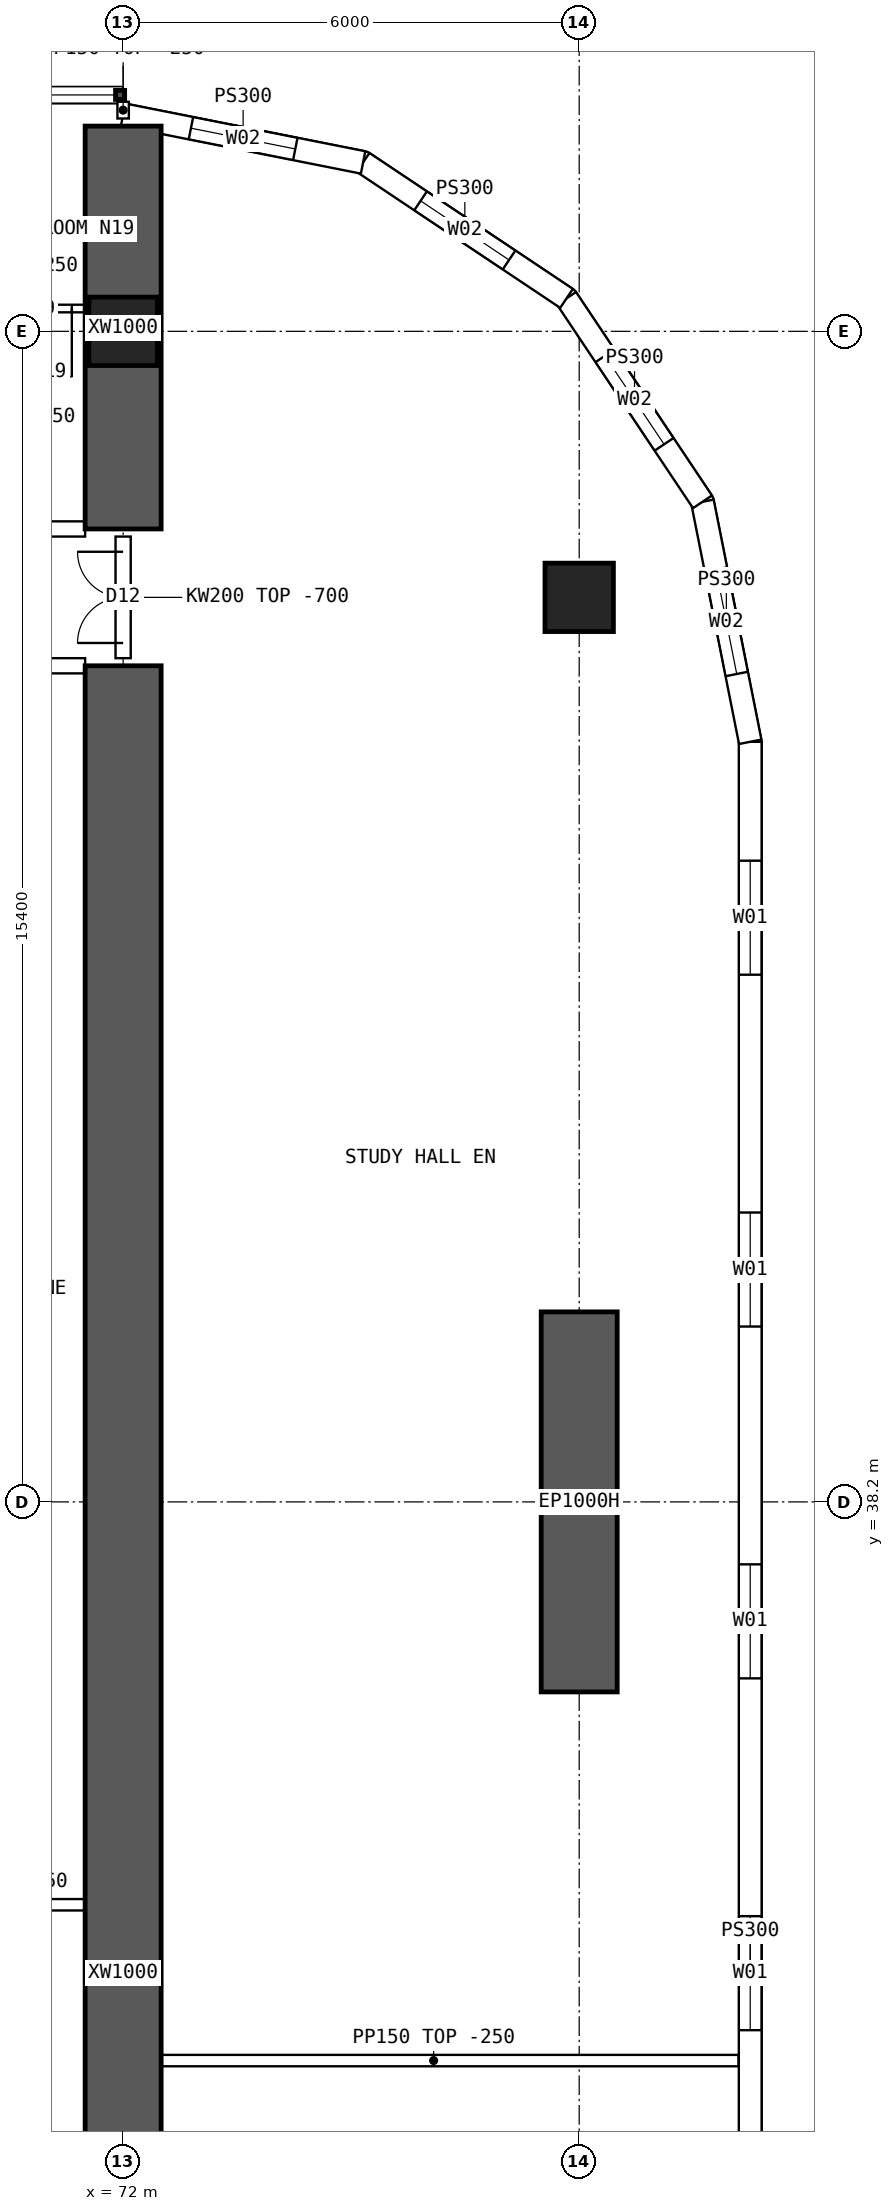
"""IFC4 building model, lengths in metres.
Left out: names, types, materials, properties, quantities, classifications, styles, units other than length and angle.
Written with IfcOpenShell. Run it as: python <this file> out.ifc"""

import sys

from ifc_helpers import new_model, si_unit, direction, frame, frame_2d, origin, origin_2d, place, context, subcontext, project, spatial, polyline, rectangle, hollow_rectangle, outline, extrude, element, fill, save


model = new_model("IFC4")
c1 = context("Model", 3, precision=1e-05, world=origin(), true_north=direction((0.0, 1.0)))
c2 = subcontext(c1, "Body", "Model", "MODEL_VIEW")
j1 = project(units=[si_unit("LENGTHUNIT", "METRE"), si_unit("PLANEANGLEUNIT", "RADIAN")], contexts=[c1])
p1 = place(None, origin())
s1 = spatial("IfcSite", under=j1, at=p1, CompositionType="ELEMENT")
p2 = place(p1, origin())
s2 = spatial("IfcBuilding", under=s1, at=p2, CompositionType="ELEMENT")
p3 = place(p2, frame((0.0, 0.0, 42.7)))
s3 = spatial("IfcBuildingStorey", under=s2, at=p3, CompositionType="ELEMENT", Elevation=42.7)
for number, where, z_axis, x_axis in (
    (1, (72.0, 53.6, 0.0), (0.0, 0.0, 1.0), (1.0, 0.0, 0.0)),
    (2, (78.0, 50.1, 0.0), (0.0, 0.0, 1.0), (1.0, 0.0, 0.0)),
):
    element("IfcColumn", number, at=place(p3, frame(where, z_axis=z_axis, x_axis=x_axis)), inside=s3, PredefinedType="COLUMN", context=c2, shape_type="SweptSolid", body=[
        extrude(hollow_rectangle(XDim=0.9, YDim=0.9, WallThickness=0.09, at=origin_2d()), origin(), (0.0, 0.0, 1.0), 3.75),
    ])
p4 = place(p3, frame((78.0, 35.7, 0.0), z_axis=(0.0, 0.0, 1.0), x_axis=(0.0, 1.0, 0.0)))
e3 = element("IfcWall", 3, at=p4, inside=s3, PredefinedType="SHEAR", context=c2, shape_type="SweptSolid", body=[
    extrude(rectangle(XDim=5.0, YDim=1.0, at=frame_2d((2.5, 0.0))), origin(), (0.0, 0.0, 1.0), 3.75),
])
p5 = place(p3, frame((72.0, 51.0, 0.0), z_axis=(0.0, 0.0, 1.0), x_axis=(0.0, 1.0, 0.0)))
e4 = element("IfcWall", 4, at=p5, inside=s3, PredefinedType="SHEAR", context=c2, shape_type="SweptSolid", body=[
    extrude(rectangle(XDim=5.3, YDim=1.0, at=frame_2d((2.65, 0.0))), origin(), (0.0, 0.0, 1.0), 3.75),
])
p6 = place(p3, frame((72.0, 14.8, 0.0), z_axis=(0.0, 0.0, 1.0), x_axis=(0.0, 1.0, 0.0)))
e5 = element("IfcWall", 5, at=p6, inside=s3, PredefinedType="SHEAR", context=c2, shape_type="SweptSolid", body=[
    extrude(rectangle(XDim=34.4, YDim=1.0, at=frame_2d((17.2, 0.0))), origin(), (0.0, 0.0, 1.0), 3.75),
])
p7 = place(p3, frame((80.25, 15.8, 0.0), z_axis=(0.0, 0.0, 1.0), x_axis=(0.0, 1.0, 0.0)))
e6 = element("IfcWall", 6, at=p7, inside=s3, PredefinedType="SOLIDWALL", context=c2, shape_type="SweptSolid", body=[
    extrude(outline(polyline([(-0.015, -0.15), (32.415, -0.15), (32.385, 0.15), (0.015, 0.15), (-0.015, -0.15)])), origin(), (0.0, 0.0, 1.0), 3.5),
])
p8 = place(p7, frame((1.564, 0.0, 0.9)))
e7 = element("IfcOpeningElement", 7, at=p8, cuts=e6, PredefinedType="OPENING", context=c2, shape_type="SweptSolid", body=[
    extrude(rectangle(XDim=1.5, YDim=2.0, at=frame_2d((0.75, 1.0))), frame((0.0, 0.16, 0.0), z_axis=(0.0, -1.0, 0.0), x_axis=(1.0, 0.0, 0.0)), (0.0, 0.0, 1.0), 0.32),
])
p9 = place(p7, frame((6.193, 0.0, 0.9)))
e8 = element("IfcOpeningElement", 8, at=p9, cuts=e6, PredefinedType="OPENING", context=c2, shape_type="SweptSolid", body=[
    extrude(rectangle(XDim=1.5, YDim=2.0, at=frame_2d((0.75, 1.0))), frame((0.0, 0.16, 0.0), z_axis=(0.0, -1.0, 0.0), x_axis=(1.0, 0.0, 0.0)), (0.0, 0.0, 1.0), 0.32),
])
p10 = place(p7, frame((10.822, 0.0, 0.9)))
e9 = element("IfcOpeningElement", 9, at=p10, cuts=e6, PredefinedType="OPENING", context=c2, shape_type="SweptSolid", body=[
    extrude(rectangle(XDim=1.5, YDim=2.0, at=frame_2d((0.75, 1.0))), frame((0.0, 0.16, 0.0), z_axis=(0.0, -1.0, 0.0), x_axis=(1.0, 0.0, 0.0)), (0.0, 0.0, 1.0), 0.32),
])
p11 = place(p7, frame((15.45, 0.0, 0.9)))
e10 = element("IfcOpeningElement", 10, at=p11, cuts=e6, PredefinedType="OPENING", context=c2, shape_type="SweptSolid", body=[
    extrude(rectangle(XDim=1.5, YDim=2.0, at=frame_2d((0.75, 1.0))), frame((0.0, 0.16, 0.0), z_axis=(0.0, -1.0, 0.0), x_axis=(1.0, 0.0, 0.0)), (0.0, 0.0, 1.0), 0.32),
])
p12 = place(p7, frame((20.079, 0.0, 0.9)))
e11 = element("IfcOpeningElement", 11, at=p12, cuts=e6, PredefinedType="OPENING", context=c2, shape_type="SweptSolid", body=[
    extrude(rectangle(XDim=1.5, YDim=2.0, at=frame_2d((0.75, 1.0))), frame((0.0, 0.16, 0.0), z_axis=(0.0, -1.0, 0.0), x_axis=(1.0, 0.0, 0.0)), (0.0, 0.0, 1.0), 0.32),
])
p13 = place(p7, frame((24.707, 0.0, 0.9)))
e12 = element("IfcOpeningElement", 12, at=p13, cuts=e6, PredefinedType="OPENING", context=c2, shape_type="SweptSolid", body=[
    extrude(rectangle(XDim=1.5, YDim=2.0, at=frame_2d((0.75, 1.0))), frame((0.0, 0.16, 0.0), z_axis=(0.0, -1.0, 0.0), x_axis=(1.0, 0.0, 0.0)), (0.0, 0.0, 1.0), 0.32),
])
p14 = place(p7, frame((29.336, 0.0, 0.9)))
e13 = element("IfcOpeningElement", 13, at=p14, cuts=e6, PredefinedType="OPENING", context=c2, shape_type="SweptSolid", body=[
    extrude(rectangle(XDim=1.5, YDim=2.0, at=frame_2d((0.75, 1.0))), frame((0.0, 0.16, 0.0), z_axis=(0.0, -1.0, 0.0), x_axis=(1.0, 0.0, 0.0)), (0.0, 0.0, 1.0), 0.32),
])
p15 = place(p3, frame((80.25, 48.2, 0.0), z_axis=(0.0, 0.0, 1.0), x_axis=(-0.195065901187, 0.980790137692, 0.0)))
e14 = element("IfcWall", 14, at=p15, inside=s3, PredefinedType="SOLIDWALL", context=c2, shape_type="SweptSolid", body=[
    extrude(outline(polyline([(-0.015, -0.15), (3.249, -0.15), (3.189, 0.15), (0.015, 0.15), (-0.015, -0.15)])), origin(), (0.0, 0.0, 1.0), 3.5),
])
p16 = place(p15, frame((0.909, 0.0, 0.9)))
e15 = element("IfcOpeningElement", 15, at=p16, cuts=e14, PredefinedType="OPENING", context=c2, shape_type="SweptSolid", body=[
    extrude(rectangle(XDim=1.4, YDim=1.8, at=frame_2d((0.7, 0.9))), frame((0.0, 0.16, 0.0), z_axis=(0.0, -1.0, 0.0), x_axis=(1.0, 0.0, 0.0)), (0.0, 0.0, 1.0), 0.32),
])
p17 = place(p3, frame((79.622, 51.357, 0.0), z_axis=(0.0, 0.0, 1.0), x_axis=(-0.555609954424, 0.831443069936, 0.0)))
e16 = element("IfcWall", 16, at=p17, inside=s3, PredefinedType="SOLIDWALL", context=c2, shape_type="SweptSolid", body=[
    extrude(outline(polyline([(-0.03, -0.15), (3.249, -0.15), (3.189, 0.15), (0.03, 0.15), (-0.03, -0.15)])), origin(), (0.0, 0.0, 1.0), 3.5),
])
p18 = place(p17, frame((0.909, 0.0, 0.9)))
e17 = element("IfcOpeningElement", 17, at=p18, cuts=e16, PredefinedType="OPENING", context=c2, shape_type="SweptSolid", body=[
    extrude(rectangle(XDim=1.4, YDim=1.8, at=frame_2d((0.7, 0.9))), frame((0.0, 0.16, 0.0), z_axis=(0.0, -1.0, 0.0), x_axis=(1.0, 0.0, 0.0)), (0.0, 0.0, 1.0), 0.32),
])
p19 = place(p3, frame((77.833, 54.034, 0.0), z_axis=(0.0, 0.0, 1.0), x_axis=(-0.831478105043, 0.555557522525, 0.0)))
e18 = element("IfcWall", 18, at=p19, inside=s3, PredefinedType="SOLIDWALL", context=c2, shape_type="SweptSolid", body=[
    extrude(outline(polyline([(-0.03, -0.15), (3.249, -0.15), (3.189, 0.15), (0.03, 0.15), (-0.03, -0.15)])), origin(), (0.0, 0.0, 1.0), 3.5),
])
p20 = place(p19, frame((0.909, 0.0, 0.9)))
e19 = element("IfcOpeningElement", 19, at=p20, cuts=e18, PredefinedType="OPENING", context=c2, shape_type="SweptSolid", body=[
    extrude(rectangle(XDim=1.4, YDim=1.8, at=frame_2d((0.7, 0.9))), frame((0.0, 0.16, 0.0), z_axis=(0.0, -1.0, 0.0), x_axis=(1.0, 0.0, 0.0)), (0.0, 0.0, 1.0), 0.32),
])
p21 = place(p3, frame((75.157, 55.822, 0.0), z_axis=(0.0, 0.0, 1.0), x_axis=(-0.980787251524, 0.195080412259, 0.0)))
e20 = element("IfcWall", 20, at=p21, inside=s3, PredefinedType="SOLIDWALL", context=c2, shape_type="SweptSolid", body=[
    extrude(outline(polyline([(-0.03, -0.15), (3.249, -0.15), (3.189, 0.15), (0.03, 0.15), (-0.03, -0.15)])), origin(), (0.0, 0.0, 1.0), 3.5),
])
p22 = place(p21, frame((0.909, 0.0, 0.9)))
e21 = element("IfcOpeningElement", 21, at=p22, cuts=e20, PredefinedType="OPENING", context=c2, shape_type="SweptSolid", body=[
    extrude(rectangle(XDim=1.4, YDim=1.8, at=frame_2d((0.7, 0.9))), frame((0.0, 0.16, 0.0), z_axis=(0.0, -1.0, 0.0), x_axis=(1.0, 0.0, 0.0)), (0.0, 0.0, 1.0), 0.32),
])
p23 = place(p3, frame((66.5, 51.0, 0.0), z_axis=(0.0, 0.0, 1.0), x_axis=(1.0, 0.0, 0.0)))
e22 = element("IfcWall", 22, at=p23, inside=s3, PredefinedType="SOLIDWALL", context=c2, shape_type="SweptSolid", body=[
    extrude(outline(polyline([(0.0, 0.0), (5.0, 0.0), (5.0, 3.1), (0.0, 3.1), (0.0, 0.0)])), frame((0.0, 0.1, 0.0), z_axis=(0.0, -1.0, 0.0), x_axis=(1.0, 0.0, 0.0)), (0.0, 0.0, 1.0), 0.2),
])
p24 = place(p23, frame((1.3, 0.0, 0.0)))
e23 = element("IfcOpeningElement", 23, at=p24, cuts=e22, PredefinedType="OPENING", context=c2, shape_type="SweptSolid", body=[
    extrude(rectangle(XDim=0.9, YDim=2.1, at=frame_2d((0.45, 1.05))), frame((0.0, 0.11, 0.0), z_axis=(0.0, -1.0, 0.0), x_axis=(1.0, 0.0, 0.0)), (0.0, 0.0, 1.0), 0.22),
])
p25 = place(p23, frame((2.675, 0.0, 0.0)))
e24 = element("IfcOpeningElement", 24, at=p25, cuts=e22, PredefinedType="OPENING", context=c2, shape_type="SweptSolid", body=[
    extrude(rectangle(XDim=0.9, YDim=2.1, at=frame_2d((0.45, 1.05))), frame((0.0, 0.11, 0.0), z_axis=(0.0, -1.0, 0.0), x_axis=(1.0, 0.0, 0.0)), (0.0, 0.0, 1.0), 0.22),
])
p26 = place(p3, frame((66.5, 49.2, 0.0), z_axis=(0.0, 0.0, 1.0), x_axis=(1.0, 0.0, 0.0)))
e25 = element("IfcWall", 25, at=p26, inside=s3, PredefinedType="SOLIDWALL", context=c2, shape_type="SweptSolid", body=[
    extrude(rectangle(XDim=5.0, YDim=0.2, at=frame_2d((2.5, 0.0))), origin(), (0.0, 0.0, 1.0), 3.5),
])
p27 = place(p26, frame((0.2, 0.0, 0.0)))
e26 = element("IfcOpeningElement", 26, at=p27, cuts=e25, PredefinedType="OPENING", context=c2, shape_type="SweptSolid", body=[
    extrude(rectangle(XDim=1.6, YDim=2.1, at=frame_2d((0.8, 1.05))), frame((0.0, 0.11, 0.0), z_axis=(0.0, -1.0, 0.0), x_axis=(1.0, 0.0, 0.0)), (0.0, 0.0, 1.0), 0.22),
])
p28 = place(p3, frame((70.25, 53.9, 0.0), z_axis=(0.0, 0.0, 1.0), x_axis=(1.0, 0.0, 0.0)))
e27 = element("IfcWall", 27, at=p28, inside=s3, PredefinedType="PARTITIONING", context=c2, shape_type="SweptSolid", body=[
    extrude(rectangle(XDim=1.3, YDim=0.1, at=frame_2d((0.65, 0.0))), origin(), (0.0, 0.0, 1.0), 3.5),
])
p29 = place(p28, frame((0.175, 0.0, 0.0)))
e28 = element("IfcOpeningElement", 28, at=p29, cuts=e27, PredefinedType="OPENING", context=c2, shape_type="SweptSolid", body=[
    extrude(rectangle(XDim=0.9, YDim=2.1, at=frame_2d((0.45, 1.05))), frame((0.0, 0.06, 0.0), z_axis=(0.0, -1.0, 0.0), x_axis=(1.0, 0.0, 0.0)), (0.0, 0.0, 1.0), 0.12),
])
p30 = place(p3, frame((68.4, 32.9, 0.0), z_axis=(0.0, 0.0, 1.0), x_axis=(1.0, 0.0, 0.0)))
e29 = element("IfcWall", 29, at=p30, inside=s3, PredefinedType="PARTITIONING", context=c2, shape_type="SweptSolid", body=[
    extrude(rectangle(XDim=3.6, YDim=0.15, at=frame_2d((1.8, 0.0))), origin(), (0.0, 0.0, 1.0), 3.5),
])
p31 = place(p3, frame((72.075, 30.85, 0.0), z_axis=(0.0, 0.0, 1.0), x_axis=(1.0, 0.0, 0.0)))
e30 = element("IfcWall", 30, at=p31, inside=s3, PredefinedType="PARTITIONING", context=c2, shape_type="SweptSolid", body=[
    extrude(outline(polyline([(0.0, 0.0), (8.02, 0.0), (8.02, 3.5), (6.227, 3.5), (6.225, 3.05), (5.627, 3.05), (5.625, 3.5), (0.0, 3.5), (0.0, 0.0)])), frame((0.0, 0.075, 0.0), z_axis=(0.0, -1.0, 0.0), x_axis=(1.0, 0.0, 0.0)), (0.0, 0.0, 1.0), 0.15),
])
p32 = place(p3, frame((72.0, 49.3, 0.0), z_axis=(0.0, 0.0, 1.0), x_axis=(0.0, 1.0, 0.0)))
e31 = element("IfcWall", 31, at=p32, inside=s3, PredefinedType="SOLIDWALL", context=c2, shape_type="SweptSolid", body=[
    extrude(outline(polyline([(0.0, 0.0), (1.6, 0.0), (1.6, 3.05), (0.0, 3.05), (0.0, 0.0)])), frame((0.0, 0.1, 0.0), z_axis=(0.0, -1.0, 0.0), x_axis=(1.0, 0.0, 0.0)), (0.0, 0.0, 1.0), 0.2),
])
p33 = place(p32, frame((0.2, 0.0, 0.0)))
e32 = element("IfcOpeningElement", 32, at=p33, cuts=e31, PredefinedType="OPENING", context=c2, shape_type="SweptSolid", body=[
    extrude(rectangle(XDim=1.2, YDim=2.1, at=frame_2d((0.6, 1.05))), frame((0.0, 0.11, 0.0), z_axis=(0.0, -1.0, 0.0), x_axis=(1.0, 0.0, 0.0)), (0.0, 0.0, 1.0), 0.22),
])
p34 = place(p3, frame((72.0, 56.4, 0.0), z_axis=(0.0, 0.0, 1.0), x_axis=(0.0, 1.0, 0.0)))
e33 = element("IfcWall", 33, at=p34, inside=s3, PredefinedType="PARTITIONING", context=c2, shape_type="SweptSolid", body=[
    extrude(rectangle(XDim=0.22, YDim=0.15, at=frame_2d((0.11, 0.0))), origin(), (0.0, 0.0, 1.0), 3.5),
])
p35 = place(p11, origin())
e34 = element("IfcWindow", 34, at=p35, inside=s3, PartitioningType="SINGLE_PANEL", PredefinedType="WINDOW", context=c2, shape_type="SweptSolid", body=[
    extrude(rectangle(XDim=1.5, YDim=2.0, at=frame_2d((0.75, 1.0))), frame((0.0, 0.03, 0.0), z_axis=(0.0, -1.0, 0.0), x_axis=(1.0, 0.0, 0.0)), (0.0, 0.0, 1.0), 0.06),
])
fill(e10, e34)
p36 = place(p12, origin())
e35 = element("IfcWindow", 35, at=p36, inside=s3, PartitioningType="SINGLE_PANEL", PredefinedType="WINDOW", context=c2, shape_type="SweptSolid", body=[
    extrude(rectangle(XDim=1.5, YDim=2.0, at=frame_2d((0.75, 1.0))), frame((0.0, 0.03, 0.0), z_axis=(0.0, -1.0, 0.0), x_axis=(1.0, 0.0, 0.0)), (0.0, 0.0, 1.0), 0.06),
])
fill(e11, e35)
p37 = place(p13, origin())
e36 = element("IfcWindow", 36, at=p37, inside=s3, PartitioningType="SINGLE_PANEL", PredefinedType="WINDOW", context=c2, shape_type="SweptSolid", body=[
    extrude(rectangle(XDim=1.5, YDim=2.0, at=frame_2d((0.75, 1.0))), frame((0.0, 0.03, 0.0), z_axis=(0.0, -1.0, 0.0), x_axis=(1.0, 0.0, 0.0)), (0.0, 0.0, 1.0), 0.06),
])
fill(e12, e36)
p38 = place(p14, origin())
e37 = element("IfcWindow", 37, at=p38, inside=s3, PartitioningType="SINGLE_PANEL", PredefinedType="WINDOW", context=c2, shape_type="SweptSolid", body=[
    extrude(rectangle(XDim=1.5, YDim=2.0, at=frame_2d((0.75, 1.0))), frame((0.0, 0.03, 0.0), z_axis=(0.0, -1.0, 0.0), x_axis=(1.0, 0.0, 0.0)), (0.0, 0.0, 1.0), 0.06),
])
fill(e13, e37)
p39 = place(p16, origin())
e38 = element("IfcWindow", 38, at=p39, inside=s3, PartitioningType="SINGLE_PANEL", PredefinedType="WINDOW", context=c2, shape_type="SweptSolid", body=[
    extrude(rectangle(XDim=1.4, YDim=1.8, at=frame_2d((0.7, 0.9))), frame((0.0, 0.03, 0.0), z_axis=(0.0, -1.0, 0.0), x_axis=(1.0, 0.0, 0.0)), (0.0, 0.0, 1.0), 0.06),
])
fill(e15, e38)
p40 = place(p18, origin())
e39 = element("IfcWindow", 39, at=p40, inside=s3, PartitioningType="SINGLE_PANEL", PredefinedType="WINDOW", context=c2, shape_type="SweptSolid", body=[
    extrude(rectangle(XDim=1.4, YDim=1.8, at=frame_2d((0.7, 0.9))), frame((0.0, 0.03, 0.0), z_axis=(0.0, -1.0, 0.0), x_axis=(1.0, 0.0, 0.0)), (0.0, 0.0, 1.0), 0.06),
])
fill(e17, e39)
p41 = place(p20, origin())
e40 = element("IfcWindow", 40, at=p41, inside=s3, PartitioningType="SINGLE_PANEL", PredefinedType="WINDOW", context=c2, shape_type="SweptSolid", body=[
    extrude(rectangle(XDim=1.4, YDim=1.8, at=frame_2d((0.7, 0.9))), frame((0.0, 0.03, 0.0), z_axis=(0.0, -1.0, 0.0), x_axis=(1.0, 0.0, 0.0)), (0.0, 0.0, 1.0), 0.06),
])
fill(e19, e40)
p42 = place(p22, origin())
e41 = element("IfcWindow", 41, at=p42, inside=s3, PartitioningType="SINGLE_PANEL", PredefinedType="WINDOW", context=c2, shape_type="SweptSolid", body=[
    extrude(rectangle(XDim=1.4, YDim=1.8, at=frame_2d((0.7, 0.9))), frame((0.0, 0.03, 0.0), z_axis=(0.0, -1.0, 0.0), x_axis=(1.0, 0.0, 0.0)), (0.0, 0.0, 1.0), 0.06),
])
fill(e21, e41)
p43 = place(p29, origin())
e42 = element("IfcDoor", 42, at=p43, inside=s3, OperationType="SINGLE_SWING_RIGHT", PredefinedType="DOOR", context=c2, shape_type="SweptSolid", body=[
    extrude(rectangle(XDim=0.9, YDim=2.1, at=frame_2d((0.45, 1.05))), frame((0.0, 0.025, 0.0), z_axis=(0.0, -1.0, 0.0), x_axis=(1.0, 0.0, 0.0)), (0.0, 0.0, 1.0), 0.05),
])
fill(e28, e42)
p44 = place(p33, origin())
e43 = element("IfcDoor", 43, at=p44, inside=s3, OperationType="DOUBLE_DOOR_SINGLE_SWING", PredefinedType="DOOR", context=c2, shape_type="SweptSolid", body=[
    extrude(rectangle(XDim=1.2, YDim=2.1, at=frame_2d((0.6, 1.05))), frame((0.0, 0.025, 0.0), z_axis=(0.0, -1.0, 0.0), x_axis=(1.0, 0.0, 0.0)), (0.0, 0.0, 1.0), 0.05),
])
fill(e32, e43)
save(model, sys.argv[1])
